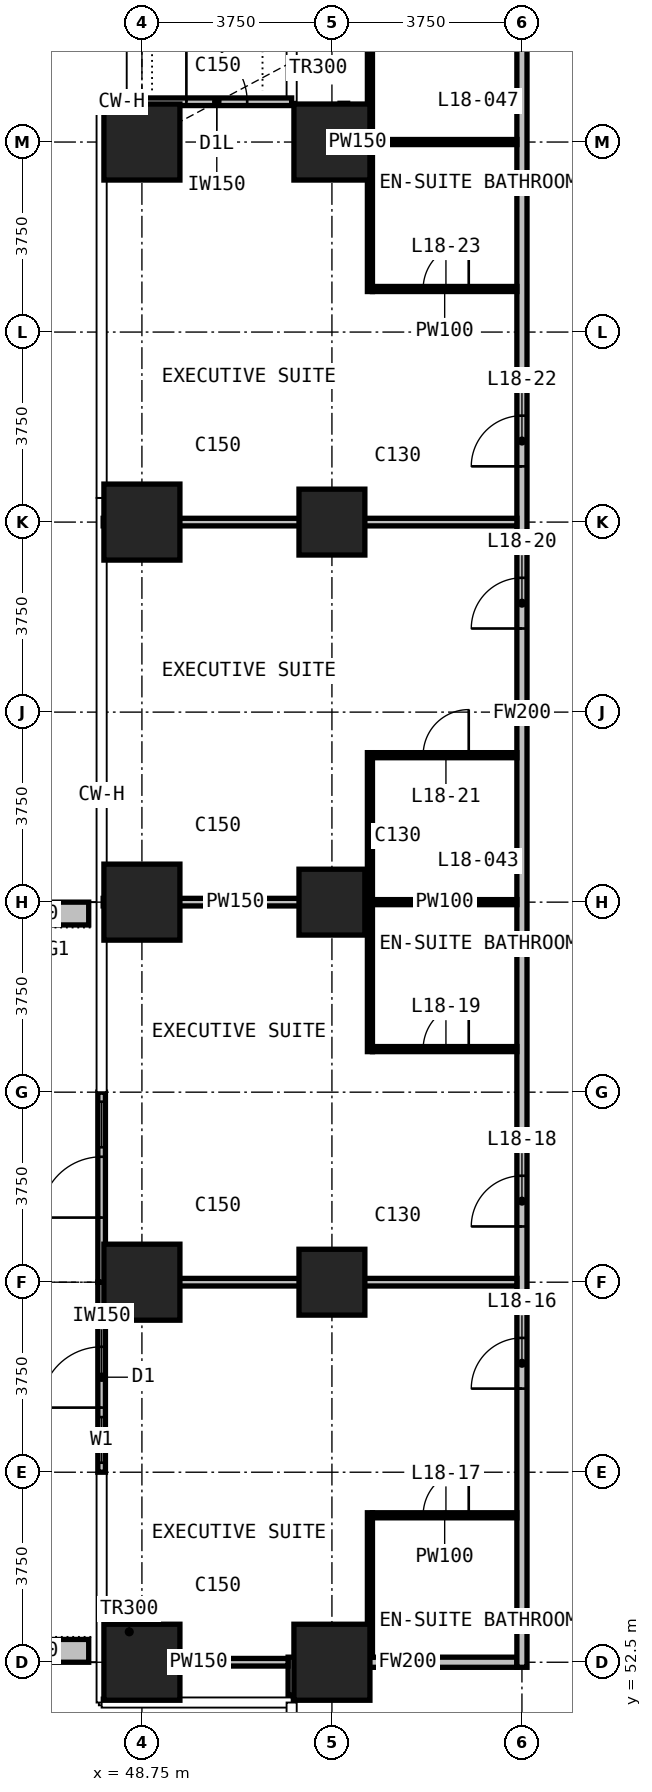
"""IFC4 building model, lengths in metres.
Left out: names, types, materials, properties, quantities, classifications, styles, units other than length and angle.
Written with IfcOpenShell. Run it as: python <this file> out.ifc"""

import sys

from ifc_helpers import new_model, si_unit, direction, frame, frame_2d, origin, origin_2d, place, context, subcontext, project, spatial, rectangle, extrude, element, fill, save


model = new_model("IFC4")
c1 = context("Model", 3, precision=1e-05, world=origin(), true_north=direction((0.0, 1.0)))
c2 = subcontext(c1, "Body", "Model", "MODEL_VIEW")
j1 = project(units=[si_unit("LENGTHUNIT", "METRE"), si_unit("PLANEANGLEUNIT", "RADIAN")], contexts=[c1])
p1 = place(None, origin())
s1 = spatial("IfcSite", under=j1, at=p1, CompositionType="ELEMENT")
p2 = place(p1, origin())
s2 = spatial("IfcBuilding", under=s1, at=p2, CompositionType="ELEMENT")
p3 = place(p2, frame((0.0, 0.0, 79.1)))
s3 = spatial("IfcBuildingStorey", under=s2, at=p3, CompositionType="ELEMENT", Elevation=79.1)
for number, where, z_axis, x_axis in (
    (1, (48.75, 52.5, 0.0), (0.0, 0.0, 1.0), (1.0, 0.0, 0.0)),
    (2, (48.75, 60.0, 0.0), (0.0, 0.0, 1.0), (1.0, 0.0, 0.0)),
    (3, (48.75, 67.5, 0.0), (0.0, 0.0, 1.0), (1.0, 0.0, 0.0)),
    (4, (48.75, 75.0, 0.0), (0.0, 0.0, 1.0), (1.0, 0.0, 0.0)),
    (5, (48.75, 82.5, 0.0), (0.0, 0.0, 1.0), (1.0, 0.0, 0.0)),
    (6, (52.5, 52.5, 0.0), (0.0, 0.0, 1.0), (1.0, 0.0, 0.0)),
):
    element("IfcColumn", number, at=place(p3, frame(where, z_axis=z_axis, x_axis=x_axis)), inside=s3, PredefinedType="COLUMN", context=c2, shape_type="SweptSolid", body=[
        extrude(rectangle(XDim=1.5, YDim=1.5, at=origin_2d()), origin(), (0.0, 0.0, 1.0), 3.3),
    ])
for number, where, z_axis, x_axis in (
    (7, (52.5, 60.0, 0.0), (0.0, 0.0, 1.0), (1.0, 0.0, 0.0)),
    (8, (52.5, 67.5, 0.0), (0.0, 0.0, 1.0), (1.0, 0.0, 0.0)),
    (9, (52.5, 75.0, 0.0), (0.0, 0.0, 1.0), (1.0, 0.0, 0.0)),
):
    element("IfcColumn", number, at=place(p3, frame(where, z_axis=z_axis, x_axis=x_axis)), inside=s3, PredefinedType="COLUMN", context=c2, shape_type="SweptSolid", body=[
        extrude(rectangle(XDim=1.3, YDim=1.3, at=origin_2d()), origin(), (0.0, 0.0, 1.0), 3.3),
    ])
p4 = place(p3, frame((52.5, 82.5, 0.0), z_axis=(0.0, 0.0, 1.0), x_axis=(1.0, 0.0, 0.0)))
e10 = element("IfcColumn", 10, at=p4, inside=s3, PredefinedType="COLUMN", context=c2, shape_type="SweptSolid", body=[
    extrude(rectangle(XDim=1.5, YDim=1.5, at=origin_2d()), origin(), (0.0, 0.0, 1.0), 3.3),
])
p5 = place(p3, frame((48.75, 83.295, 0.0), z_axis=(0.0, 0.0, 1.0), x_axis=(1.0, 0.0, 0.0)))
e11 = element("IfcWall", 11, at=p5, inside=s3, PredefinedType="SOLIDWALL", context=c2, shape_type="SweptSolid", body=[
    extrude(rectangle(XDim=2.955, YDim=0.15, at=frame_2d((1.478, 0.0))), origin(), (0.0, 0.0, 1.0), 3.0),
])
p6 = place(p5, frame((0.877, 0.0, 0.0)))
e12 = element("IfcOpeningElement", 12, at=p6, cuts=e11, PredefinedType="OPENING", context=c2, shape_type="SweptSolid", body=[
    extrude(rectangle(XDim=1.2, YDim=2.0, at=frame_2d((0.6, 1.0))), frame((0.0, 0.085, 0.0), z_axis=(0.0, -1.0, 0.0), x_axis=(1.0, 0.0, 0.0)), (0.0, 0.0, 1.0), 0.17),
])
p7 = place(p3, frame((47.955, 56.25, 0.0), z_axis=(0.0, 0.0, 1.0), x_axis=(0.0, 1.0, 0.0)))
e13 = element("IfcWall", 13, at=p7, inside=s3, PredefinedType="SOLIDWALL", context=c2, shape_type="SweptSolid", body=[
    extrude(rectangle(XDim=3.75, YDim=0.15, at=frame_2d((1.875, 0.0))), origin(), (0.0, 0.0, 1.0), 3.0),
])
p8 = place(p7, frame((0.188, 0.0, 0.1)))
e14 = element("IfcOpeningElement", 14, at=p8, cuts=e13, PredefinedType="OPENING", context=c2, shape_type="SweptSolid", body=[
    extrude(rectangle(XDim=0.9, YDim=2.4, at=frame_2d((0.45, 1.2))), frame((0.0, 0.085, 0.0), z_axis=(0.0, -1.0, 0.0), x_axis=(1.0, 0.0, 0.0)), (0.0, 0.0, 1.0), 0.17),
])
p9 = place(p7, frame((1.275, 0.0, 0.0)))
e15 = element("IfcOpeningElement", 15, at=p9, cuts=e13, PredefinedType="OPENING", context=c2, shape_type="SweptSolid", body=[
    extrude(rectangle(XDim=1.2, YDim=2.4, at=frame_2d((0.6, 1.2))), frame((0.0, 0.085, 0.0), z_axis=(0.0, -1.0, 0.0), x_axis=(1.0, 0.0, 0.0)), (0.0, 0.0, 1.0), 0.17),
])
p10 = place(p3, frame((47.955, 60.0, 0.0), z_axis=(0.0, 0.0, 1.0), x_axis=(0.0, 1.0, 0.0)))
e16 = element("IfcWall", 16, at=p10, inside=s3, PredefinedType="SOLIDWALL", context=c2, shape_type="SweptSolid", body=[
    extrude(rectangle(XDim=3.75, YDim=0.15, at=frame_2d((1.875, 0.0))), origin(), (0.0, 0.0, 1.0), 3.0),
])
p11 = place(p10, frame((1.275, 0.0, 0.0)))
e17 = element("IfcOpeningElement", 17, at=p11, cuts=e16, PredefinedType="OPENING", context=c2, shape_type="SweptSolid", body=[
    extrude(rectangle(XDim=1.2, YDim=2.4, at=frame_2d((0.6, 1.2))), frame((0.0, 0.085, 0.0), z_axis=(0.0, -1.0, 0.0), x_axis=(1.0, 0.0, 0.0)), (0.0, 0.0, 1.0), 0.17),
])
p12 = place(p10, frame((2.663, 0.0, 0.1)))
e18 = element("IfcOpeningElement", 18, at=p12, cuts=e16, PredefinedType="OPENING", context=c2, shape_type="SweptSolid", body=[
    extrude(rectangle(XDim=0.9, YDim=2.4, at=frame_2d((0.45, 1.2))), frame((0.0, 0.085, 0.0), z_axis=(0.0, -1.0, 0.0), x_axis=(1.0, 0.0, 0.0)), (0.0, 0.0, 1.0), 0.17),
])
for number, where, z_axis, x_axis in (
    (19, (47.7, 52.725, 0.0), (0.0, 0.0, 1.0), (-1.0, 0.0, 0.0)),
    (20, (47.7, 67.275, 0.0), (0.0, 0.0, 1.0), (-1.0, 0.0, 0.0)),
):
    element("IfcWall", number, at=place(p3, frame(where, z_axis=z_axis, x_axis=x_axis)), inside=s3, PredefinedType="USERDEFINED", context=c2, shape_type="SweptSolid", body=[
        extrude(rectangle(XDim=2.35, YDim=0.45, at=frame_2d((1.175, 0.0))), origin(), (0.0, 0.0, 1.0), 1.1),
    ])
p13 = place(p3, frame((51.835, 52.5, 0.0), z_axis=(0.0, 0.0, 1.0), x_axis=(1.0, 0.0, 0.0)))
e21 = element("IfcWall", 21, at=p13, inside=s3, PredefinedType="PARTITIONING", context=c2, shape_type="SweptSolid", body=[
    extrude(rectangle(XDim=4.315, YDim=0.2, at=frame_2d((2.157, 0.0))), origin(), (0.0, 0.0, 1.0), 3.0),
])
p14 = place(p3, frame((51.735, 51.855, 0.0), z_axis=(0.0, 0.0, 1.0), x_axis=(0.0, 1.0, 0.0)))
e22 = element("IfcWall", 22, at=p14, inside=s3, PredefinedType="PARTITIONING", context=c2, shape_type="SweptSolid", body=[
    extrude(rectangle(XDim=0.745, YDim=0.2, at=frame_2d((0.373, 0.0))), origin(), (0.0, 0.0, 1.0), 3.0),
])
p15 = place(p3, frame((56.25, 52.4, 0.0), z_axis=(0.0, 0.0, 1.0), x_axis=(0.0, 1.0, 0.0)))
e23 = element("IfcWall", 23, at=p15, inside=s3, PredefinedType="PARTITIONING", context=c2, shape_type="SweptSolid", body=[
    extrude(rectangle(XDim=37.675, YDim=0.2, at=frame_2d((18.837, 0.0))), origin(), (0.0, 0.0, 1.0), 3.0),
])
p16 = place(p15, frame((5.5, 0.0, 0.0)))
e24 = element("IfcOpeningElement", 24, at=p16, cuts=e23, PredefinedType="OPENING", context=c2, shape_type="SweptSolid", body=[
    extrude(rectangle(XDim=1.0, YDim=2.2, at=frame_2d((0.5, 1.1))), frame((0.0, 0.11, 0.0), z_axis=(0.0, -1.0, 0.0), x_axis=(1.0, 0.0, 0.0)), (0.0, 0.0, 1.0), 0.22),
])
p17 = place(p15, frame((8.7, 0.0, 0.0)))
e25 = element("IfcOpeningElement", 25, at=p17, cuts=e23, PredefinedType="OPENING", context=c2, shape_type="SweptSolid", body=[
    extrude(rectangle(XDim=1.0, YDim=2.2, at=frame_2d((0.5, 1.1))), frame((0.0, 0.11, 0.0), z_axis=(0.0, -1.0, 0.0), x_axis=(1.0, 0.0, 0.0)), (0.0, 0.0, 1.0), 0.22),
])
p18 = place(p15, frame((20.5, 0.0, 0.0)))
e26 = element("IfcOpeningElement", 26, at=p18, cuts=e23, PredefinedType="OPENING", context=c2, shape_type="SweptSolid", body=[
    extrude(rectangle(XDim=1.0, YDim=2.2, at=frame_2d((0.5, 1.1))), frame((0.0, 0.11, 0.0), z_axis=(0.0, -1.0, 0.0), x_axis=(1.0, 0.0, 0.0)), (0.0, 0.0, 1.0), 0.22),
])
p19 = place(p15, frame((23.7, 0.0, 0.0)))
e27 = element("IfcOpeningElement", 27, at=p19, cuts=e23, PredefinedType="OPENING", context=c2, shape_type="SweptSolid", body=[
    extrude(rectangle(XDim=1.0, YDim=2.2, at=frame_2d((0.5, 1.1))), frame((0.0, 0.11, 0.0), z_axis=(0.0, -1.0, 0.0), x_axis=(1.0, 0.0, 0.0)), (0.0, 0.0, 1.0), 0.22),
])
p20 = place(p15, frame((35.5, 0.0, 0.0)))
e28 = element("IfcOpeningElement", 28, at=p20, cuts=e23, PredefinedType="OPENING", context=c2, shape_type="SweptSolid", body=[
    extrude(rectangle(XDim=1.0, YDim=2.2, at=frame_2d((0.5, 1.1))), frame((0.0, 0.11, 0.0), z_axis=(0.0, -1.0, 0.0), x_axis=(1.0, 0.0, 0.0)), (0.0, 0.0, 1.0), 0.22),
])
p21 = place(p3, frame((48.105, 52.5, 0.0), z_axis=(0.0, 0.0, 1.0), x_axis=(1.0, 0.0, 0.0)))
e29 = element("IfcWall", 29, at=p21, inside=s3, PredefinedType="PARTITIONING", context=c2, shape_type="SweptSolid", body=[
    extrude(rectangle(XDim=3.53, YDim=0.15, at=frame_2d((1.765, 0.0))), origin(), (0.0, 0.0, 1.0), 3.0),
])
p22 = place(p3, frame((48.04, 60.0, 0.0), z_axis=(0.0, 0.0, 1.0), x_axis=(1.0, 0.0, 0.0)))
e30 = element("IfcWall", 30, at=p22, inside=s3, PredefinedType="PARTITIONING", context=c2, shape_type="SweptSolid", body=[
    extrude(rectangle(XDim=8.11, YDim=0.15, at=frame_2d((4.055, 0.0))), origin(), (0.0, 0.0, 1.0), 3.0),
])
p23 = place(p3, frame((47.985, 67.5, 0.0), z_axis=(0.0, 0.0, 1.0), x_axis=(1.0, 0.0, 0.0)))
e31 = element("IfcWall", 31, at=p23, inside=s3, PredefinedType="PARTITIONING", context=c2, shape_type="SweptSolid", body=[
    extrude(rectangle(XDim=5.215, YDim=0.15, at=frame_2d((2.607, 0.0))), origin(), (0.0, 0.0, 1.0), 3.0),
])
p24 = place(p3, frame((47.985, 75.0, 0.0), z_axis=(0.0, 0.0, 1.0), x_axis=(1.0, 0.0, 0.0)))
e32 = element("IfcWall", 32, at=p24, inside=s3, PredefinedType="PARTITIONING", context=c2, shape_type="SweptSolid", body=[
    extrude(rectangle(XDim=8.165, YDim=0.15, at=frame_2d((4.083, 0.0))), origin(), (0.0, 0.0, 1.0), 3.0),
])
p25 = place(p3, frame((52.81, 82.5, 0.0), z_axis=(0.0, 0.0, 1.0), x_axis=(1.0, 0.0, 0.0)))
e33 = element("IfcWall", 33, at=p25, inside=s3, PredefinedType="PARTITIONING", context=c2, shape_type="SweptSolid", body=[
    extrude(rectangle(XDim=0.39, YDim=0.15, at=frame_2d((0.195, 0.0))), origin(), (0.0, 0.0, 1.0), 3.0),
])
p26 = place(p3, frame((52.735, 82.425, 0.0), z_axis=(0.0, 0.0, 1.0), x_axis=(0.0, 1.0, 0.0)))
e34 = element("IfcWall", 34, at=p26, inside=s3, PredefinedType="PARTITIONING", context=c2, shape_type="SweptSolid", body=[
    extrude(rectangle(XDim=0.84, YDim=0.15, at=frame_2d((0.42, 0.0))), origin(), (0.0, 0.0, 1.0), 3.0),
])
p27 = place(p3, frame((53.3, 55.4, 0.0), z_axis=(0.0, 0.0, 1.0), x_axis=(1.0, 0.0, 0.0)))
e35 = element("IfcWall", 35, at=p27, inside=s3, PredefinedType="PARTITIONING", context=c2, shape_type="SweptSolid", body=[
    extrude(rectangle(XDim=2.85, YDim=0.1, at=frame_2d((1.425, 0.0))), origin(), (0.0, 0.0, 1.0), 3.0),
])
p28 = place(p27, frame((1.0, 0.0, 0.0)))
e36 = element("IfcOpeningElement", 36, at=p28, cuts=e35, PredefinedType="OPENING", context=c2, shape_type="SweptSolid", body=[
    extrude(rectangle(XDim=0.9, YDim=2.2, at=frame_2d((0.45, 1.1))), frame((0.0, 0.06, 0.0), z_axis=(0.0, -1.0, 0.0), x_axis=(1.0, 0.0, 0.0)), (0.0, 0.0, 1.0), 0.12),
])
p29 = place(p3, frame((53.3, 64.6, 0.0), z_axis=(0.0, 0.0, 1.0), x_axis=(1.0, 0.0, 0.0)))
e37 = element("IfcWall", 37, at=p29, inside=s3, PredefinedType="PARTITIONING", context=c2, shape_type="SweptSolid", body=[
    extrude(rectangle(XDim=2.85, YDim=0.1, at=frame_2d((1.425, 0.0))), origin(), (0.0, 0.0, 1.0), 3.0),
])
p30 = place(p29, frame((1.0, 0.0, 0.0)))
e38 = element("IfcOpeningElement", 38, at=p30, cuts=e37, PredefinedType="OPENING", context=c2, shape_type="SweptSolid", body=[
    extrude(rectangle(XDim=0.9, YDim=2.2, at=frame_2d((0.45, 1.1))), frame((0.0, 0.06, 0.0), z_axis=(0.0, -1.0, 0.0), x_axis=(1.0, 0.0, 0.0)), (0.0, 0.0, 1.0), 0.12),
])
p31 = place(p3, frame((53.3, 67.5, 0.0), z_axis=(0.0, 0.0, 1.0), x_axis=(1.0, 0.0, 0.0)))
e39 = element("IfcWall", 39, at=p31, inside=s3, PredefinedType="PARTITIONING", context=c2, shape_type="SweptSolid", body=[
    extrude(rectangle(XDim=2.85, YDim=0.1, at=frame_2d((1.425, 0.0))), origin(), (0.0, 0.0, 1.0), 3.0),
])
p32 = place(p3, frame((53.3, 70.4, 0.0), z_axis=(0.0, 0.0, 1.0), x_axis=(1.0, 0.0, 0.0)))
e40 = element("IfcWall", 40, at=p32, inside=s3, PredefinedType="PARTITIONING", context=c2, shape_type="SweptSolid", body=[
    extrude(rectangle(XDim=2.85, YDim=0.1, at=frame_2d((1.425, 0.0))), origin(), (0.0, 0.0, 1.0), 3.0),
])
p33 = place(p32, frame((1.0, 0.0, 0.0)))
e41 = element("IfcOpeningElement", 41, at=p33, cuts=e40, PredefinedType="OPENING", context=c2, shape_type="SweptSolid", body=[
    extrude(rectangle(XDim=0.9, YDim=2.2, at=frame_2d((0.45, 1.1))), frame((0.0, 0.06, 0.0), z_axis=(0.0, -1.0, 0.0), x_axis=(1.0, 0.0, 0.0)), (0.0, 0.0, 1.0), 0.12),
])
p34 = place(p3, frame((53.3, 79.6, 0.0), z_axis=(0.0, 0.0, 1.0), x_axis=(1.0, 0.0, 0.0)))
e42 = element("IfcWall", 42, at=p34, inside=s3, PredefinedType="PARTITIONING", context=c2, shape_type="SweptSolid", body=[
    extrude(rectangle(XDim=2.85, YDim=0.1, at=frame_2d((1.425, 0.0))), origin(), (0.0, 0.0, 1.0), 3.0),
])
p35 = place(p34, frame((1.0, 0.0, 0.0)))
e43 = element("IfcOpeningElement", 43, at=p35, cuts=e42, PredefinedType="OPENING", context=c2, shape_type="SweptSolid", body=[
    extrude(rectangle(XDim=0.9, YDim=2.2, at=frame_2d((0.45, 1.1))), frame((0.0, 0.06, 0.0), z_axis=(0.0, -1.0, 0.0), x_axis=(1.0, 0.0, 0.0)), (0.0, 0.0, 1.0), 0.12),
])
for number, where, z_axis, x_axis in (
    (44, (53.3, 82.5, 0.0), (0.0, 0.0, 1.0), (1.0, 0.0, 0.0)),
    (45, (53.25, 52.6, 0.0), (0.0, 0.0, 1.0), (0.0, 1.0, 0.0)),
):
    element("IfcWall", number, at=place(p3, frame(where, z_axis=z_axis, x_axis=x_axis)), inside=s3, PredefinedType="PARTITIONING", context=c2, shape_type="SweptSolid", body=[
        extrude(rectangle(XDim=2.85, YDim=0.1, at=frame_2d((1.425, 0.0))), origin(), (0.0, 0.0, 1.0), 3.0),
    ])
for number, where, z_axis, x_axis in (
    (46, (53.25, 64.55, 0.0), (0.0, 0.0, 1.0), (0.0, 1.0, 0.0)),
    (47, (53.25, 79.55, 0.0), (0.0, 0.0, 1.0), (0.0, 1.0, 0.0)),
):
    element("IfcWall", number, at=place(p3, frame(where, z_axis=z_axis, x_axis=x_axis)), inside=s3, PredefinedType="PARTITIONING", context=c2, shape_type="SweptSolid", body=[
        extrude(rectangle(XDim=5.9, YDim=0.1, at=frame_2d((2.95, 0.0))), origin(), (0.0, 0.0, 1.0), 3.0),
    ])
p36 = place(p6, origin())
e48 = element("IfcDoor", 48, at=p36, inside=s3, OperationType="SINGLE_SWING_LEFT", PredefinedType="DOOR", context=c2, shape_type="SweptSolid", body=[
    extrude(rectangle(XDim=1.2, YDim=2.0, at=frame_2d((0.6, 1.0))), frame((0.0, 0.025, 0.0), z_axis=(0.0, -1.0, 0.0), x_axis=(1.0, 0.0, 0.0)), (0.0, 0.0, 1.0), 0.05),
])
fill(e12, e48)
p37 = place(p8, origin())
e49 = element("IfcWindow", 49, at=p37, inside=s3, PartitioningType="SINGLE_PANEL", PredefinedType="WINDOW", context=c2, shape_type="SweptSolid", body=[
    extrude(rectangle(XDim=0.9, YDim=2.4, at=frame_2d((0.45, 1.2))), frame((0.0, 0.03, 0.0), z_axis=(0.0, -1.0, 0.0), x_axis=(1.0, 0.0, 0.0)), (0.0, 0.0, 1.0), 0.06),
])
fill(e14, e49)
p38 = place(p9, origin())
e50 = element("IfcDoor", 50, at=p38, inside=s3, OperationType="SINGLE_SWING_LEFT", PredefinedType="DOOR", context=c2, shape_type="SweptSolid", body=[
    extrude(rectangle(XDim=1.2, YDim=2.4, at=frame_2d((0.6, 1.2))), frame((0.0, 0.025, 0.0), z_axis=(0.0, -1.0, 0.0), x_axis=(1.0, 0.0, 0.0)), (0.0, 0.0, 1.0), 0.05),
])
fill(e15, e50)
p39 = place(p11, origin())
e51 = element("IfcDoor", 51, at=p39, inside=s3, OperationType="SINGLE_SWING_LEFT", PredefinedType="DOOR", context=c2, shape_type="SweptSolid", body=[
    extrude(rectangle(XDim=1.2, YDim=2.4, at=frame_2d((0.6, 1.2))), frame((0.0, 0.025, 0.0), z_axis=(0.0, -1.0, 0.0), x_axis=(1.0, 0.0, 0.0)), (0.0, 0.0, 1.0), 0.05),
])
fill(e17, e51)
p40 = place(p12, origin())
e52 = element("IfcWindow", 52, at=p40, inside=s3, PartitioningType="SINGLE_PANEL", PredefinedType="WINDOW", context=c2, shape_type="SweptSolid", body=[
    extrude(rectangle(XDim=0.9, YDim=2.4, at=frame_2d((0.45, 1.2))), frame((0.0, 0.03, 0.0), z_axis=(0.0, -1.0, 0.0), x_axis=(1.0, 0.0, 0.0)), (0.0, 0.0, 1.0), 0.06),
])
fill(e18, e52)
p41 = place(p16, origin())
e53 = element("IfcDoor", 53, at=p41, inside=s3, OperationType="SINGLE_SWING_RIGHT", PredefinedType="DOOR", context=c2, shape_type="SweptSolid", body=[
    extrude(rectangle(XDim=1.0, YDim=2.2, at=frame_2d((0.5, 1.1))), frame((0.0, 0.025, 0.0), z_axis=(0.0, -1.0, 0.0), x_axis=(1.0, 0.0, 0.0)), (0.0, 0.0, 1.0), 0.05),
])
fill(e24, e53)
p42 = place(p28, origin())
e54 = element("IfcDoor", 54, at=p42, inside=s3, OperationType="SINGLE_SWING_RIGHT", PredefinedType="DOOR", context=c2, shape_type="SweptSolid", body=[
    extrude(rectangle(XDim=0.9, YDim=2.2, at=frame_2d((0.45, 1.1))), frame((0.0, 0.025, 0.0), z_axis=(0.0, -1.0, 0.0), x_axis=(1.0, 0.0, 0.0)), (0.0, 0.0, 1.0), 0.05),
])
fill(e36, e54)
p43 = place(p17, origin())
e55 = element("IfcDoor", 55, at=p43, inside=s3, OperationType="SINGLE_SWING_LEFT", PredefinedType="DOOR", context=c2, shape_type="SweptSolid", body=[
    extrude(rectangle(XDim=1.0, YDim=2.2, at=frame_2d((0.5, 1.1))), frame((0.0, 0.025, 0.0), z_axis=(0.0, -1.0, 0.0), x_axis=(1.0, 0.0, 0.0)), (0.0, 0.0, 1.0), 0.05),
])
fill(e25, e55)
p44 = place(p30, origin())
e56 = element("IfcDoor", 56, at=p44, inside=s3, OperationType="SINGLE_SWING_RIGHT", PredefinedType="DOOR", context=c2, shape_type="SweptSolid", body=[
    extrude(rectangle(XDim=0.9, YDim=2.2, at=frame_2d((0.45, 1.1))), frame((0.0, 0.025, 0.0), z_axis=(0.0, -1.0, 0.0), x_axis=(1.0, 0.0, 0.0)), (0.0, 0.0, 1.0), 0.05),
])
fill(e38, e56)
p45 = place(p18, origin())
e57 = element("IfcDoor", 57, at=p45, inside=s3, OperationType="SINGLE_SWING_RIGHT", PredefinedType="DOOR", context=c2, shape_type="SweptSolid", body=[
    extrude(rectangle(XDim=1.0, YDim=2.2, at=frame_2d((0.5, 1.1))), frame((0.0, 0.025, 0.0), z_axis=(0.0, -1.0, 0.0), x_axis=(1.0, 0.0, 0.0)), (0.0, 0.0, 1.0), 0.05),
])
fill(e26, e57)
p46 = place(p33, origin())
e58 = element("IfcDoor", 58, at=p46, inside=s3, OperationType="SINGLE_SWING_RIGHT", PredefinedType="DOOR", context=c2, shape_type="SweptSolid", body=[
    extrude(rectangle(XDim=0.9, YDim=2.2, at=frame_2d((0.45, 1.1))), frame((0.0, 0.025, 0.0), z_axis=(0.0, -1.0, 0.0), x_axis=(1.0, 0.0, 0.0)), (0.0, 0.0, 1.0), 0.05),
])
fill(e41, e58)
p47 = place(p19, origin())
e59 = element("IfcDoor", 59, at=p47, inside=s3, OperationType="SINGLE_SWING_LEFT", PredefinedType="DOOR", context=c2, shape_type="SweptSolid", body=[
    extrude(rectangle(XDim=1.0, YDim=2.2, at=frame_2d((0.5, 1.1))), frame((0.0, 0.025, 0.0), z_axis=(0.0, -1.0, 0.0), x_axis=(1.0, 0.0, 0.0)), (0.0, 0.0, 1.0), 0.05),
])
fill(e27, e59)
p48 = place(p35, origin())
e60 = element("IfcDoor", 60, at=p48, inside=s3, OperationType="SINGLE_SWING_RIGHT", PredefinedType="DOOR", context=c2, shape_type="SweptSolid", body=[
    extrude(rectangle(XDim=0.9, YDim=2.2, at=frame_2d((0.45, 1.1))), frame((0.0, 0.025, 0.0), z_axis=(0.0, -1.0, 0.0), x_axis=(1.0, 0.0, 0.0)), (0.0, 0.0, 1.0), 0.05),
])
fill(e43, e60)
save(model, sys.argv[1])
